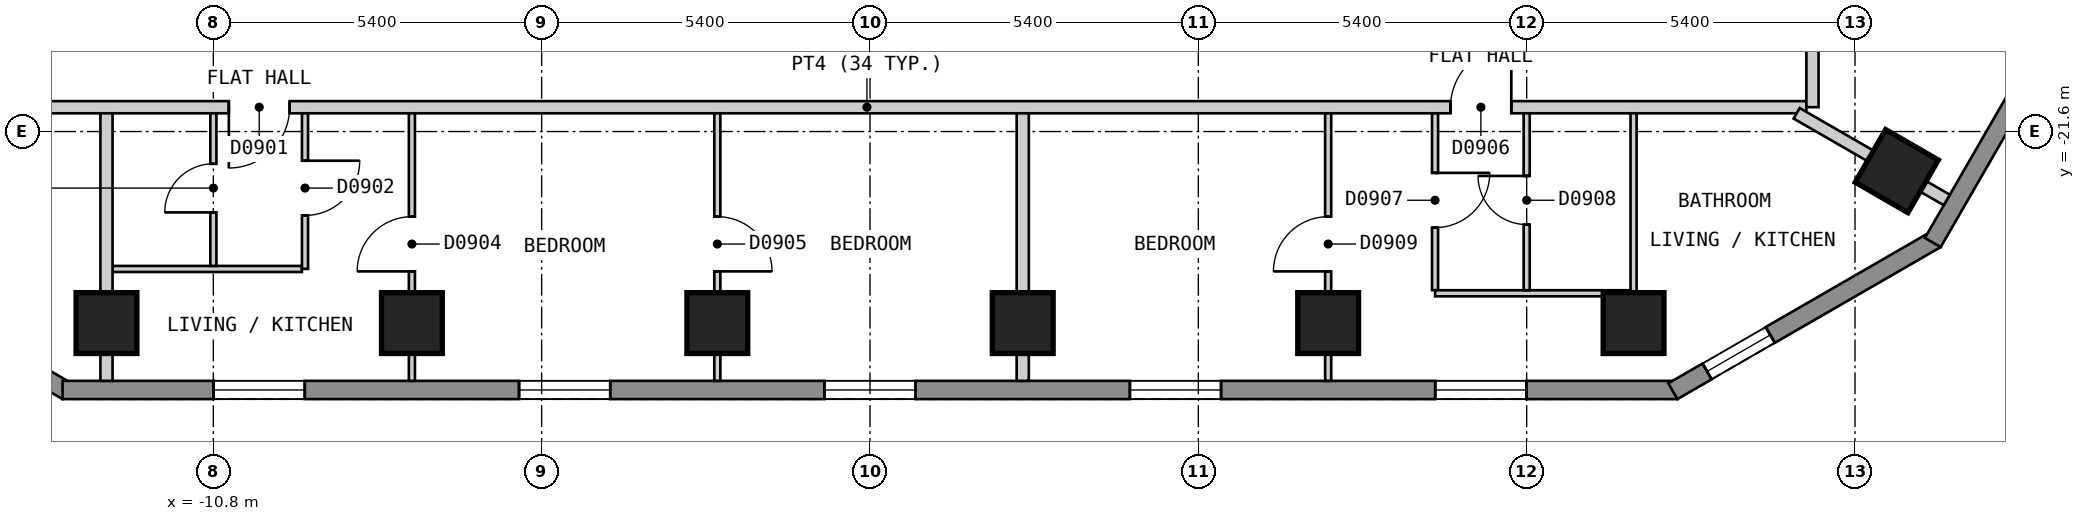
"""IFC4 building model, lengths in metres.
Left out: names, types, materials, properties, quantities, classifications, styles, units other than length and angle.
Written with IfcOpenShell. Run it as: python <this file> out.ifc"""

import sys

from ifc_helpers import new_model, si_unit, direction, frame, frame_2d, origin, origin_2d, place, context, subcontext, project, spatial, polyline, rectangle, outline, extrude, element, fill, save


model = new_model("IFC4")
c1 = context("Model", 3, precision=1e-05, world=origin(), true_north=direction((0.0, 1.0)))
c2 = subcontext(c1, "Body", "Model", "MODEL_VIEW")
j1 = project(units=[si_unit("LENGTHUNIT", "METRE"), si_unit("PLANEANGLEUNIT", "RADIAN")], contexts=[c1])
p1 = place(None, origin())
s1 = spatial("IfcSite", under=j1, at=p1, CompositionType="ELEMENT")
p2 = place(p1, origin())
s2 = spatial("IfcBuilding", under=s1, at=p2, CompositionType="ELEMENT")
p3 = place(p2, frame((0.0, 0.0, 90.0)))
s3 = spatial("IfcBuildingStorey", under=s2, at=p3, CompositionType="ELEMENT", Elevation=90.0)
for number, where, z_axis, x_axis in (
    (1, (-12.557, -24.75, 0.0), (0.0, 0.0, 1.0), (1.0, 0.0, 0.0)),
    (2, (-7.534, -24.75, 0.0), (0.0, 0.0, 1.0), (1.0, 0.0, 0.0)),
    (3, (-2.511, -24.75, 0.0), (0.0, 0.0, 1.0), (1.0, 0.0, 0.0)),
    (4, (2.512, -24.75, 0.0), (0.0, 0.0, 1.0), (1.0, 0.0, 0.0)),
    (5, (7.535, -24.75, 0.0), (0.0, 0.0, 1.0), (1.0, 0.0, 0.0)),
    (6, (12.558, -24.75, 0.0), (0.0, 0.0, 1.0), (1.0, 0.0, 0.0)),
    (7, (16.887, -22.251, 0.0), (0.0, 0.0, 1.0), (0.5, 0.866, 0.0)),
):
    element("IfcColumn", number, at=place(p3, frame(where, z_axis=z_axis, x_axis=x_axis)), inside=s3, PredefinedType="COLUMN", context=c2, shape_type="SweptSolid", body=[
        extrude(rectangle(XDim=1.0, YDim=1.0, at=origin_2d()), origin(), (0.0, 0.0, 1.0), 3.0),
    ])
p4 = place(p3, frame((-17.534, -23.37, 0.0), z_axis=(0.0, 0.0, 1.0), x_axis=(0.866010750942, -0.50002537861, 0.0)))
e8 = element("IfcWall", 8, at=p4, inside=s3, PredefinedType="SOLIDWALL", context=c2, shape_type="SweptSolid", body=[
    extrude(outline(polyline([(0.0, -0.15), (5.0, -0.15), (4.919, 0.15), (0.08, 0.15), (0.0, -0.15)])), origin(), (0.0, 0.0, 1.0), 2.7),
])
p5 = place(p4, frame((0.65, 0.0, 0.15)))
e9 = element("IfcOpeningElement", 9, at=p5, cuts=e8, PredefinedType="OPENING", context=c2, shape_type="SweptSolid", body=[
    extrude(rectangle(XDim=1.2, YDim=2.1, at=frame_2d((0.6, 1.05))), frame((0.0, 0.16, 0.0), z_axis=(0.0, -1.0, 0.0), x_axis=(1.0, 0.0, 0.0)), (0.0, 0.0, 1.0), 0.32),
])
p6 = place(p3, frame((-13.279, -25.85, 0.0), z_axis=(0.0, 0.0, 1.0), x_axis=(1.0, 0.0, 0.0)))
e10 = element("IfcWall", 10, at=p6, inside=s3, PredefinedType="SOLIDWALL", context=c2, shape_type="SweptSolid", body=[
    extrude(outline(polyline([(0.0, -0.15), (26.558, -0.15), (26.478, 0.15), (0.08, 0.15), (0.0, -0.15)])), origin(), (0.0, 0.0, 1.0), 2.7),
])
p7 = place(p6, frame((2.483, 0.0, 0.15)))
e11 = element("IfcOpeningElement", 11, at=p7, cuts=e10, PredefinedType="OPENING", context=c2, shape_type="SweptSolid", body=[
    extrude(rectangle(XDim=1.5, YDim=2.1, at=frame_2d((0.75, 1.05))), frame((0.0, 0.16, 0.0), z_axis=(0.0, -1.0, 0.0), x_axis=(1.0, 0.0, 0.0)), (0.0, 0.0, 1.0), 0.32),
])
p8 = place(p6, frame((7.507, 0.0, 0.15)))
e12 = element("IfcOpeningElement", 12, at=p8, cuts=e10, PredefinedType="OPENING", context=c2, shape_type="SweptSolid", body=[
    extrude(rectangle(XDim=1.5, YDim=2.1, at=frame_2d((0.75, 1.05))), frame((0.0, 0.16, 0.0), z_axis=(0.0, -1.0, 0.0), x_axis=(1.0, 0.0, 0.0)), (0.0, 0.0, 1.0), 0.32),
])
p9 = place(p6, frame((12.529, 0.0, 0.15)))
e13 = element("IfcOpeningElement", 13, at=p9, cuts=e10, PredefinedType="OPENING", context=c2, shape_type="SweptSolid", body=[
    extrude(rectangle(XDim=1.5, YDim=2.1, at=frame_2d((0.75, 1.05))), frame((0.0, 0.16, 0.0), z_axis=(0.0, -1.0, 0.0), x_axis=(1.0, 0.0, 0.0)), (0.0, 0.0, 1.0), 0.32),
])
p10 = place(p6, frame((17.553, 0.0, 0.15)))
e14 = element("IfcOpeningElement", 14, at=p10, cuts=e10, PredefinedType="OPENING", context=c2, shape_type="SweptSolid", body=[
    extrude(rectangle(XDim=1.5, YDim=2.1, at=frame_2d((0.75, 1.05))), frame((0.0, 0.16, 0.0), z_axis=(0.0, -1.0, 0.0), x_axis=(1.0, 0.0, 0.0)), (0.0, 0.0, 1.0), 0.32),
])
p11 = place(p6, frame((22.575, 0.0, 0.15)))
e15 = element("IfcOpeningElement", 15, at=p11, cuts=e10, PredefinedType="OPENING", context=c2, shape_type="SweptSolid", body=[
    extrude(rectangle(XDim=1.5, YDim=2.1, at=frame_2d((0.75, 1.05))), frame((0.0, 0.16, 0.0), z_axis=(0.0, -1.0, 0.0), x_axis=(1.0, 0.0, 0.0)), (0.0, 0.0, 1.0), 0.32),
])
p12 = place(p3, frame((13.204, -25.87, 0.0), z_axis=(0.0, 0.0, 1.0), x_axis=(0.866010750942, 0.50002537861, 0.0)))
e16 = element("IfcWall", 16, at=p12, inside=s3, PredefinedType="SOLIDWALL", context=c2, shape_type="SweptSolid", body=[
    extrude(outline(polyline([(0.0, -0.15), (5.0, -0.15), (4.919, 0.15), (0.08, 0.15), (0.0, -0.15)])), origin(), (0.0, 0.0, 1.0), 2.7),
])
p13 = place(p12, frame((0.65, 0.0, 0.15)))
e17 = element("IfcOpeningElement", 17, at=p13, cuts=e16, PredefinedType="OPENING", context=c2, shape_type="SweptSolid", body=[
    extrude(rectangle(XDim=1.2, YDim=2.1, at=frame_2d((0.6, 1.05))), frame((0.0, 0.16, 0.0), z_axis=(0.0, -1.0, 0.0), x_axis=(1.0, 0.0, 0.0)), (0.0, 0.0, 1.0), 0.32),
])
p14 = place(p3, frame((17.479, -23.425, 0.0), z_axis=(0.0, 0.0, 1.0), x_axis=(0.500035407905, 0.866004960056, 0.0)))
e18 = element("IfcWall", 18, at=p14, inside=s3, PredefinedType="SOLIDWALL", context=c2, shape_type="SweptSolid", body=[
    extrude(outline(polyline([(0.0, -0.15), (23.094, -0.15), (23.014, 0.15), (0.08, 0.15), (0.0, -0.15)])), origin(), (0.0, 0.0, 1.0), 2.7),
])
p15 = place(p14, frame((2.677, 0.0, 0.15)))
e19 = element("IfcOpeningElement", 19, at=p15, cuts=e18, PredefinedType="OPENING", context=c2, shape_type="SweptSolid", body=[
    extrude(rectangle(XDim=1.5, YDim=2.1, at=frame_2d((0.75, 1.05))), frame((0.0, 0.16, 0.0), z_axis=(0.0, -1.0, 0.0), x_axis=(1.0, 0.0, 0.0)), (0.0, 0.0, 1.0), 0.32),
])
p16 = place(p14, frame((8.091, 0.0, 0.15)))
e20 = element("IfcOpeningElement", 20, at=p16, cuts=e18, PredefinedType="OPENING", context=c2, shape_type="SweptSolid", body=[
    extrude(rectangle(XDim=1.5, YDim=2.1, at=frame_2d((0.75, 1.05))), frame((0.0, 0.16, 0.0), z_axis=(0.0, -1.0, 0.0), x_axis=(1.0, 0.0, 0.0)), (0.0, 0.0, 1.0), 0.32),
])
p17 = place(p14, frame((13.504, 0.0, 0.15)))
e21 = element("IfcOpeningElement", 21, at=p17, cuts=e18, PredefinedType="OPENING", context=c2, shape_type="SweptSolid", body=[
    extrude(rectangle(XDim=1.5, YDim=2.1, at=frame_2d((0.75, 1.05))), frame((0.0, 0.16, 0.0), z_axis=(0.0, -1.0, 0.0), x_axis=(1.0, 0.0, 0.0)), (0.0, 0.0, 1.0), 0.32),
])
p18 = place(p14, frame((18.917, 0.0, 0.15)))
e22 = element("IfcOpeningElement", 22, at=p18, cuts=e18, PredefinedType="OPENING", context=c2, shape_type="SweptSolid", body=[
    extrude(rectangle(XDim=1.5, YDim=2.1, at=frame_2d((0.75, 1.05))), frame((0.0, 0.16, 0.0), z_axis=(0.0, -1.0, 0.0), x_axis=(1.0, 0.0, 0.0)), (0.0, 0.0, 1.0), 0.32),
])
p19 = place(p3, frame((-15.499, -21.2, 0.0), z_axis=(0.0, 0.0, 1.0), x_axis=(1.0, 0.0, 0.0)))
e23 = element("IfcWall", 23, at=p19, inside=s3, PredefinedType="PARTITIONING", context=c2, shape_type="SweptSolid", body=[
    extrude(rectangle(XDim=30.898, YDim=0.2, at=frame_2d((15.449, 0.0))), origin(), (0.0, 0.0, 1.0), 2.7),
])
p20 = place(p19, frame((4.954, 0.0, 0.0)))
e24 = element("IfcOpeningElement", 24, at=p20, cuts=e23, PredefinedType="OPENING", context=c2, shape_type="SweptSolid", body=[
    extrude(rectangle(XDim=1.0, YDim=2.1, at=frame_2d((0.5, 1.05))), frame((0.0, 0.11, 0.0), z_axis=(0.0, -1.0, 0.0), x_axis=(1.0, 0.0, 0.0)), (0.0, 0.0, 1.0), 0.22),
])
p21 = place(p19, frame((25.046, 0.0, 0.0)))
e25 = element("IfcOpeningElement", 25, at=p21, cuts=e23, PredefinedType="OPENING", context=c2, shape_type="SweptSolid", body=[
    extrude(rectangle(XDim=1.0, YDim=2.1, at=frame_2d((0.5, 1.05))), frame((0.0, 0.11, 0.0), z_axis=(0.0, -1.0, 0.0), x_axis=(1.0, 0.0, 0.0)), (0.0, 0.0, 1.0), 0.22),
])
p22 = place(p3, frame((15.5, -21.199, 0.0), z_axis=(0.0, 0.0, 1.0), x_axis=(0.0, 1.0, 0.0)))
e26 = element("IfcWall", 26, at=p22, inside=s3, PredefinedType="PARTITIONING", context=c2, shape_type="SweptSolid", body=[
    extrude(rectangle(XDim=5.942, YDim=0.2, at=frame_2d((2.971, 0.0))), origin(), (0.0, 0.0, 1.0), 2.7),
])
p23 = place(p3, frame((-7.534, -21.3, 0.0), z_axis=(0.0, 0.0, 1.0), x_axis=(0.0, -1.0, 0.0)))
e27 = element("IfcWall", 27, at=p23, inside=s3, PredefinedType="PARTITIONING", context=c2, shape_type="SweptSolid", body=[
    extrude(rectangle(XDim=4.4, YDim=0.1, at=frame_2d((2.2, 0.0))), origin(), (0.0, 0.0, 1.0), 2.7),
])
p24 = place(p23, frame((1.7, 0.0, 0.0)))
e28 = element("IfcOpeningElement", 28, at=p24, cuts=e27, PredefinedType="OPENING", context=c2, shape_type="SweptSolid", body=[
    extrude(rectangle(XDim=0.9, YDim=2.1, at=frame_2d((0.45, 1.05))), frame((0.0, 0.06, 0.0), z_axis=(0.0, -1.0, 0.0), x_axis=(1.0, 0.0, 0.0)), (0.0, 0.0, 1.0), 0.12),
])
p25 = place(p3, frame((9.293, -21.3, 0.0), z_axis=(0.0, 0.0, 1.0), x_axis=(0.0, -1.0, 0.0)))
e29 = element("IfcWall", 29, at=p25, inside=s3, PredefinedType="PARTITIONING", context=c2, shape_type="SweptSolid", body=[
    extrude(rectangle(XDim=2.909, YDim=0.1, at=frame_2d((1.455, 0.0))), origin(), (0.0, 0.0, 1.0), 2.7),
])
p26 = place(p25, frame((0.98, 0.0, 0.0)))
e30 = element("IfcOpeningElement", 30, at=p26, cuts=e29, PredefinedType="OPENING", context=c2, shape_type="SweptSolid", body=[
    extrude(rectangle(XDim=0.9, YDim=2.1, at=frame_2d((0.45, 1.05))), frame((0.0, 0.06, 0.0), z_axis=(0.0, -1.0, 0.0), x_axis=(1.0, 0.0, 0.0)), (0.0, 0.0, 1.0), 0.12),
])
p27 = place(p3, frame((-12.457, -23.86, 0.0), z_axis=(0.0, 0.0, 1.0), x_axis=(1.0, 0.0, 0.0)))
e31 = element("IfcWall", 31, at=p27, inside=s3, PredefinedType="PARTITIONING", context=c2, shape_type="SweptSolid", body=[
    extrude(rectangle(XDim=3.114, YDim=0.1, at=frame_2d((1.557, 0.0))), origin(), (0.0, 0.0, 1.0), 2.7),
])
p28 = place(p3, frame((9.294, -24.26, 0.0), z_axis=(0.0, 0.0, 1.0), x_axis=(1.0, 0.0, 0.0)))
e32 = element("IfcWall", 32, at=p28, inside=s3, PredefinedType="PARTITIONING", context=c2, shape_type="SweptSolid", body=[
    extrude(rectangle(XDim=3.213, YDim=0.1, at=frame_2d((1.606, 0.0))), origin(), (0.0, 0.0, 1.0), 2.7),
])
p29 = place(p3, frame((7.535, -25.7, 0.0), z_axis=(0.0, 0.0, 1.0), x_axis=(0.0, 1.0, 0.0)))
e33 = element("IfcWall", 33, at=p29, inside=s3, PredefinedType="PARTITIONING", context=c2, shape_type="SweptSolid", body=[
    extrude(rectangle(XDim=4.4, YDim=0.1, at=frame_2d((2.2, 0.0))), origin(), (0.0, 0.0, 1.0), 2.7),
])
p30 = place(p29, frame((1.8, 0.0, 0.0)))
e34 = element("IfcOpeningElement", 34, at=p30, cuts=e33, PredefinedType="OPENING", context=c2, shape_type="SweptSolid", body=[
    extrude(rectangle(XDim=0.9, YDim=2.1, at=frame_2d((0.45, 1.05))), frame((0.0, 0.06, 0.0), z_axis=(0.0, -1.0, 0.0), x_axis=(1.0, 0.0, 0.0)), (0.0, 0.0, 1.0), 0.12),
])
p31 = place(p3, frame((10.8, -24.21, 0.0), z_axis=(0.0, 0.0, 1.0), x_axis=(0.0, 1.0, 0.0)))
e35 = element("IfcWall", 35, at=p31, inside=s3, PredefinedType="PARTITIONING", context=c2, shape_type="SweptSolid", body=[
    extrude(rectangle(XDim=2.91, YDim=0.1, at=frame_2d((1.455, 0.0))), origin(), (0.0, 0.0, 1.0), 2.7),
])
p32 = place(p31, frame((1.08, 0.0, 0.0)))
e36 = element("IfcOpeningElement", 36, at=p32, cuts=e35, PredefinedType="OPENING", context=c2, shape_type="SweptSolid", body=[
    extrude(rectangle(XDim=0.8, YDim=2.1, at=frame_2d((0.4, 1.05))), frame((0.0, 0.06, 0.0), z_axis=(0.0, -1.0, 0.0), x_axis=(1.0, 0.0, 0.0)), (0.0, 0.0, 1.0), 0.12),
])
p33 = place(p3, frame((12.558, -24.259, 0.0), z_axis=(0.0, 0.0, 1.0), x_axis=(0.0, 1.0, 0.0)))
e37 = element("IfcWall", 37, at=p33, inside=s3, PredefinedType="PARTITIONING", context=c2, shape_type="SweptSolid", body=[
    extrude(rectangle(XDim=2.959, YDim=0.1, at=frame_2d((1.479, 0.0))), origin(), (0.0, 0.0, 1.0), 2.7),
])
p34 = place(p3, frame((-9.292, -23.859, 0.0), z_axis=(0.0, 0.0, 1.0), x_axis=(0.0, 1.0, 0.0)))
e38 = element("IfcWall", 38, at=p34, inside=s3, PredefinedType="PARTITIONING", context=c2, shape_type="SweptSolid", body=[
    extrude(rectangle(XDim=2.559, YDim=0.1, at=frame_2d((1.279, 0.0))), origin(), (0.0, 0.0, 1.0), 2.7),
])
p35 = place(p34, frame((0.879, 0.0, 0.0)))
e39 = element("IfcOpeningElement", 39, at=p35, cuts=e38, PredefinedType="OPENING", context=c2, shape_type="SweptSolid", body=[
    extrude(rectangle(XDim=0.9, YDim=2.1, at=frame_2d((0.45, 1.05))), frame((0.0, 0.06, 0.0), z_axis=(0.0, -1.0, 0.0), x_axis=(1.0, 0.0, 0.0)), (0.0, 0.0, 1.0), 0.12),
])
p36 = place(p3, frame((-10.799, -23.81, 0.0), z_axis=(0.0, 0.0, 1.0), x_axis=(0.0, 1.0, 0.0)))
e40 = element("IfcWall", 40, at=p36, inside=s3, PredefinedType="PARTITIONING", context=c2, shape_type="SweptSolid", body=[
    extrude(rectangle(XDim=2.51, YDim=0.1, at=frame_2d((1.255, 0.0))), origin(), (0.0, 0.0, 1.0), 2.7),
])
p37 = place(p36, frame((0.88, 0.0, 0.0)))
e41 = element("IfcOpeningElement", 41, at=p37, cuts=e40, PredefinedType="OPENING", context=c2, shape_type="SweptSolid", body=[
    extrude(rectangle(XDim=0.8, YDim=2.1, at=frame_2d((0.4, 1.05))), frame((0.0, 0.06, 0.0), z_axis=(0.0, -1.0, 0.0), x_axis=(1.0, 0.0, 0.0)), (0.0, 0.0, 1.0), 0.12),
])
p38 = place(p3, frame((-2.511, -25.7, 0.0), z_axis=(0.0, 0.0, 1.0), x_axis=(0.0, 1.0, 0.0)))
e42 = element("IfcWall", 42, at=p38, inside=s3, PredefinedType="PARTITIONING", context=c2, shape_type="SweptSolid", body=[
    extrude(rectangle(XDim=4.4, YDim=0.1, at=frame_2d((2.2, 0.0))), origin(), (0.0, 0.0, 1.0), 2.7),
])
p39 = place(p38, frame((1.8, 0.0, 0.0)))
e43 = element("IfcOpeningElement", 43, at=p39, cuts=e42, PredefinedType="OPENING", context=c2, shape_type="SweptSolid", body=[
    extrude(rectangle(XDim=0.9, YDim=2.1, at=frame_2d((0.45, 1.05))), frame((0.0, 0.06, 0.0), z_axis=(0.0, -1.0, 0.0), x_axis=(1.0, 0.0, 0.0)), (0.0, 0.0, 1.0), 0.12),
])
p40 = place(p3, frame((15.24, -21.3, 0.0), z_axis=(0.0, 0.0, 1.0), x_axis=(0.866090043625, -0.499888023795, 0.0)))
e44 = element("IfcWall", 44, at=p40, inside=s3, PredefinedType="PARTITIONING", context=c2, shape_type="SweptSolid", body=[
    extrude(rectangle(XDim=2.851, YDim=0.2, at=frame_2d((1.425, 0.0))), origin(), (0.0, 0.0, 1.0), 2.7),
])
for number, where, z_axis, x_axis in (
    (45, (2.512, -25.7, 0.0), (0.0, 0.0, 1.0), (0.0, 1.0, 0.0)),
    (46, (-12.557, -25.7, 0.0), (0.0, 0.0, 1.0), (0.0, 1.0, 0.0)),
):
    element("IfcWall", number, at=place(p3, frame(where, z_axis=z_axis, x_axis=x_axis)), inside=s3, PredefinedType="PARTITIONING", context=c2, shape_type="SweptSolid", body=[
        extrude(rectangle(XDim=4.4, YDim=0.2, at=frame_2d((2.2, 0.0))), origin(), (0.0, 0.0, 1.0), 2.7),
    ])
p41 = place(p7, origin())
e47 = element("IfcWindow", 47, at=p41, inside=s3, PartitioningType="SINGLE_PANEL", PredefinedType="WINDOW", context=c2, shape_type="SweptSolid", body=[
    extrude(rectangle(XDim=1.5, YDim=2.1, at=frame_2d((0.75, 1.05))), frame((0.0, 0.03, 0.0), z_axis=(0.0, -1.0, 0.0), x_axis=(1.0, 0.0, 0.0)), (0.0, 0.0, 1.0), 0.06),
])
fill(e11, e47)
p42 = place(p8, origin())
e48 = element("IfcWindow", 48, at=p42, inside=s3, PartitioningType="SINGLE_PANEL", PredefinedType="WINDOW", context=c2, shape_type="SweptSolid", body=[
    extrude(rectangle(XDim=1.5, YDim=2.1, at=frame_2d((0.75, 1.05))), frame((0.0, 0.03, 0.0), z_axis=(0.0, -1.0, 0.0), x_axis=(1.0, 0.0, 0.0)), (0.0, 0.0, 1.0), 0.06),
])
fill(e12, e48)
p43 = place(p9, origin())
e49 = element("IfcWindow", 49, at=p43, inside=s3, PartitioningType="SINGLE_PANEL", PredefinedType="WINDOW", context=c2, shape_type="SweptSolid", body=[
    extrude(rectangle(XDim=1.5, YDim=2.1, at=frame_2d((0.75, 1.05))), frame((0.0, 0.03, 0.0), z_axis=(0.0, -1.0, 0.0), x_axis=(1.0, 0.0, 0.0)), (0.0, 0.0, 1.0), 0.06),
])
fill(e13, e49)
p44 = place(p10, origin())
e50 = element("IfcWindow", 50, at=p44, inside=s3, PartitioningType="SINGLE_PANEL", PredefinedType="WINDOW", context=c2, shape_type="SweptSolid", body=[
    extrude(rectangle(XDim=1.5, YDim=2.1, at=frame_2d((0.75, 1.05))), frame((0.0, 0.03, 0.0), z_axis=(0.0, -1.0, 0.0), x_axis=(1.0, 0.0, 0.0)), (0.0, 0.0, 1.0), 0.06),
])
fill(e14, e50)
p45 = place(p11, origin())
e51 = element("IfcWindow", 51, at=p45, inside=s3, PartitioningType="SINGLE_PANEL", PredefinedType="WINDOW", context=c2, shape_type="SweptSolid", body=[
    extrude(rectangle(XDim=1.5, YDim=2.1, at=frame_2d((0.75, 1.05))), frame((0.0, 0.03, 0.0), z_axis=(0.0, -1.0, 0.0), x_axis=(1.0, 0.0, 0.0)), (0.0, 0.0, 1.0), 0.06),
])
fill(e15, e51)
p46 = place(p13, origin())
e52 = element("IfcWindow", 52, at=p46, inside=s3, PartitioningType="SINGLE_PANEL", PredefinedType="WINDOW", context=c2, shape_type="SweptSolid", body=[
    extrude(rectangle(XDim=1.2, YDim=2.1, at=frame_2d((0.6, 1.05))), frame((0.0, 0.03, 0.0), z_axis=(0.0, -1.0, 0.0), x_axis=(1.0, 0.0, 0.0)), (0.0, 0.0, 1.0), 0.06),
])
fill(e17, e52)
p47 = place(p20, origin())
e53 = element("IfcDoor", 53, at=p47, inside=s3, OperationType="SINGLE_SWING_LEFT", PredefinedType="DOOR", context=c2, shape_type="SweptSolid", body=[
    extrude(rectangle(XDim=1.0, YDim=2.1, at=frame_2d((0.5, 1.05))), frame((0.0, 0.025, 0.0), z_axis=(0.0, -1.0, 0.0), x_axis=(1.0, 0.0, 0.0)), (0.0, 0.0, 1.0), 0.05),
])
fill(e24, e53)
p48 = place(p35, origin())
e54 = element("IfcDoor", 54, at=p48, inside=s3, OperationType="SINGLE_SWING_RIGHT", PredefinedType="DOOR", context=c2, shape_type="SweptSolid", body=[
    extrude(rectangle(XDim=0.9, YDim=2.1, at=frame_2d((0.45, 1.05))), frame((0.0, 0.025, 0.0), z_axis=(0.0, -1.0, 0.0), x_axis=(1.0, 0.0, 0.0)), (0.0, 0.0, 1.0), 0.05),
])
fill(e39, e54)
p49 = place(p37, origin())
e55 = element("IfcDoor", 55, at=p49, inside=s3, OperationType="SINGLE_SWING_LEFT", PredefinedType="DOOR", context=c2, shape_type="SweptSolid", body=[
    extrude(rectangle(XDim=0.8, YDim=2.1, at=frame_2d((0.4, 1.05))), frame((0.0, 0.025, 0.0), z_axis=(0.0, -1.0, 0.0), x_axis=(1.0, 0.0, 0.0)), (0.0, 0.0, 1.0), 0.05),
])
fill(e41, e55)
p50 = place(p24, origin())
e56 = element("IfcDoor", 56, at=p50, inside=s3, OperationType="SINGLE_SWING_RIGHT", PredefinedType="DOOR", context=c2, shape_type="SweptSolid", body=[
    extrude(rectangle(XDim=0.9, YDim=2.1, at=frame_2d((0.45, 1.05))), frame((0.0, 0.025, 0.0), z_axis=(0.0, -1.0, 0.0), x_axis=(1.0, 0.0, 0.0)), (0.0, 0.0, 1.0), 0.05),
])
fill(e28, e56)
p51 = place(p39, origin())
e57 = element("IfcDoor", 57, at=p51, inside=s3, OperationType="SINGLE_SWING_LEFT", PredefinedType="DOOR", context=c2, shape_type="SweptSolid", body=[
    extrude(rectangle(XDim=0.9, YDim=2.1, at=frame_2d((0.45, 1.05))), frame((0.0, 0.025, 0.0), z_axis=(0.0, -1.0, 0.0), x_axis=(1.0, 0.0, 0.0)), (0.0, 0.0, 1.0), 0.05),
])
fill(e43, e57)
p52 = place(p21, origin())
e58 = element("IfcDoor", 58, at=p52, inside=s3, OperationType="SINGLE_SWING_RIGHT", PredefinedType="DOOR", context=c2, shape_type="SweptSolid", body=[
    extrude(rectangle(XDim=1.0, YDim=2.1, at=frame_2d((0.5, 1.05))), frame((0.0, 0.025, 0.0), z_axis=(0.0, -1.0, 0.0), x_axis=(1.0, 0.0, 0.0)), (0.0, 0.0, 1.0), 0.05),
])
fill(e25, e58)
p53 = place(p26, origin())
e59 = element("IfcDoor", 59, at=p53, inside=s3, OperationType="SINGLE_SWING_LEFT", PredefinedType="DOOR", context=c2, shape_type="SweptSolid", body=[
    extrude(rectangle(XDim=0.9, YDim=2.1, at=frame_2d((0.45, 1.05))), frame((0.0, 0.025, 0.0), z_axis=(0.0, -1.0, 0.0), x_axis=(1.0, 0.0, 0.0)), (0.0, 0.0, 1.0), 0.05),
])
fill(e30, e59)
p54 = place(p32, origin())
e60 = element("IfcDoor", 60, at=p54, inside=s3, OperationType="SINGLE_SWING_RIGHT", PredefinedType="DOOR", context=c2, shape_type="SweptSolid", body=[
    extrude(rectangle(XDim=0.8, YDim=2.1, at=frame_2d((0.4, 1.05))), frame((0.0, 0.025, 0.0), z_axis=(0.0, -1.0, 0.0), x_axis=(1.0, 0.0, 0.0)), (0.0, 0.0, 1.0), 0.05),
])
fill(e36, e60)
p55 = place(p30, origin())
e61 = element("IfcDoor", 61, at=p55, inside=s3, OperationType="SINGLE_SWING_LEFT", PredefinedType="DOOR", context=c2, shape_type="SweptSolid", body=[
    extrude(rectangle(XDim=0.9, YDim=2.1, at=frame_2d((0.45, 1.05))), frame((0.0, 0.025, 0.0), z_axis=(0.0, -1.0, 0.0), x_axis=(1.0, 0.0, 0.0)), (0.0, 0.0, 1.0), 0.05),
])
fill(e34, e61)
save(model, sys.argv[1])
